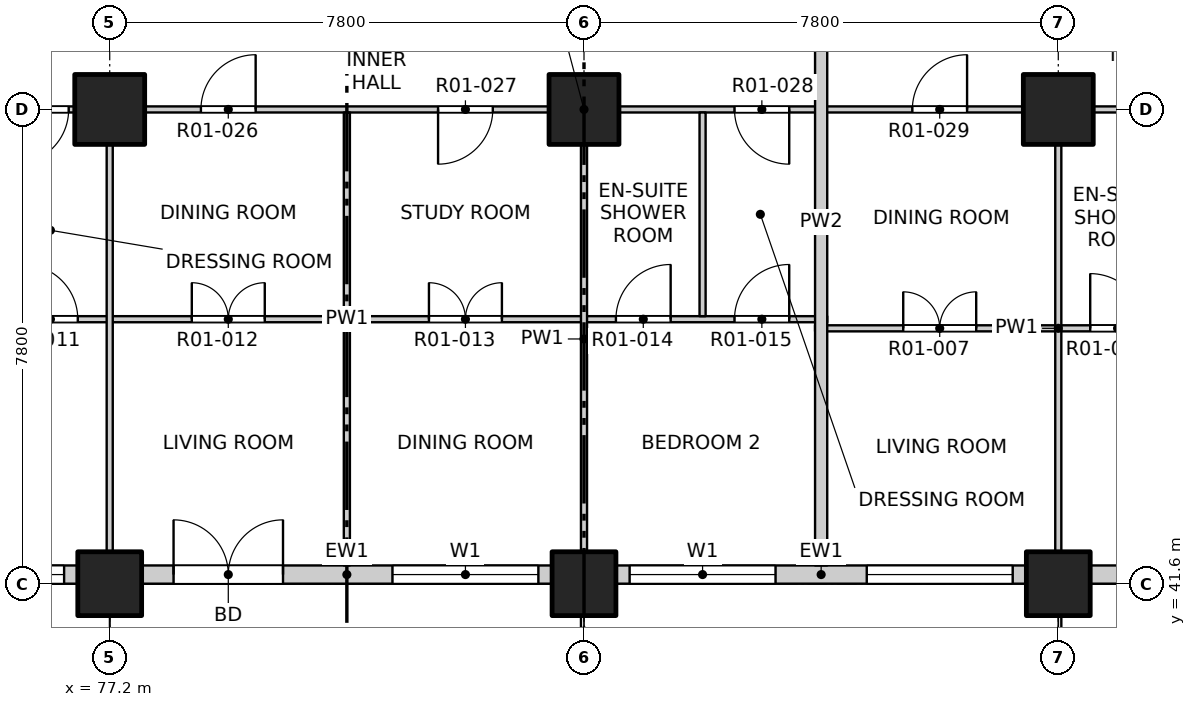
"""IFC4 building model, lengths in metres.
Left out: names, types, materials, properties, quantities, classifications, styles, units other than length and angle.
Written with IfcOpenShell. Run it as: python <this file> out.ifc"""

import sys

from ifc_helpers import new_model, si_unit, direction, frame, frame_2d, origin, origin_2d, place, context, subcontext, project, spatial, rectangle, extrude, element, fill, save


model = new_model("IFC4")
c1 = context("Model", 3, precision=1e-05, world=origin(), true_north=direction((0.0, 1.0)))
c2 = subcontext(c1, "Body", "Model", "MODEL_VIEW")
j1 = project(units=[si_unit("LENGTHUNIT", "METRE"), si_unit("PLANEANGLEUNIT", "RADIAN")], contexts=[c1])
p1 = place(None, origin())
s1 = spatial("IfcSite", under=j1, at=p1, CompositionType="ELEMENT")
p2 = place(p1, origin())
s2 = spatial("IfcBuilding", under=s1, at=p2, CompositionType="ELEMENT")
p3 = place(p2, frame((0.0, 0.0, 19.5)))
s3 = spatial("IfcBuildingStorey", under=s2, at=p3, CompositionType="ELEMENT", Elevation=19.5)
for number, where, z_axis, x_axis in (
    (1, (77.2, 41.6, -0.25), (0.0, 0.0, 1.0), (1.0, 0.0, 0.0)),
    (2, (85.0, 41.6, -0.25), (0.0, 0.0, 1.0), (1.0, 0.0, 0.0)),
    (3, (92.8, 41.6, -0.25), (0.0, 0.0, 1.0), (1.0, 0.0, 0.0)),
):
    element("IfcColumn", number, at=place(p3, frame(where, z_axis=z_axis, x_axis=x_axis)), inside=s3, PredefinedType="COLUMN", context=c2, shape_type="SweptSolid", body=[
        extrude(rectangle(XDim=1.05, YDim=1.05, at=origin_2d()), origin(), (0.0, 0.0, 1.0), 3.4),
    ])
for number, where, z_axis, x_axis in (
    (4, (77.2, 49.4, -0.25), (0.0, 0.0, 1.0), (1.0, 0.0, 0.0)),
    (5, (85.0, 49.4, -0.25), (0.0, 0.0, 1.0), (1.0, 0.0, 0.0)),
    (6, (92.8, 49.4, -0.25), (0.0, 0.0, 1.0), (1.0, 0.0, 0.0)),
):
    element("IfcColumn", number, at=place(p3, frame(where, z_axis=z_axis, x_axis=x_axis)), inside=s3, PredefinedType="COLUMN", context=c2, shape_type="SweptSolid", body=[
        extrude(rectangle(XDim=1.15, YDim=1.15, at=origin_2d()), origin(), (0.0, 0.0, 1.0), 3.4),
    ])
p4 = place(p3, frame((69.925, 41.75, 0.0), z_axis=(0.0, 0.0, 1.0), x_axis=(1.0, 0.0, 0.0)))
e7 = element("IfcWall", 7, at=p4, inside=s3, PredefinedType="SOLIDWALL", context=c2, shape_type="SweptSolid", body=[
    extrude(rectangle(XDim=6.75, YDim=0.3, at=frame_2d((3.375, 0.0))), origin(), (0.0, 0.0, 1.0), 2.7),
])
p5 = place(p4, frame((0.525, 0.0, 0.0)))
e8 = element("IfcOpeningElement", 8, at=p5, cuts=e7, PredefinedType="OPENING", context=c2, shape_type="SweptSolid", body=[
    extrude(rectangle(XDim=1.8, YDim=2.4, at=frame_2d((0.9, 1.2))), frame((0.0, 0.16, 0.0), z_axis=(0.0, -1.0, 0.0), x_axis=(1.0, 0.0, 0.0)), (0.0, 0.0, 1.0), 0.32),
])
p6 = place(p4, frame((4.125, 0.0, 0.9)))
e9 = element("IfcOpeningElement", 9, at=p6, cuts=e7, PredefinedType="OPENING", context=c2, shape_type="SweptSolid", body=[
    extrude(rectangle(XDim=2.4, YDim=1.8, at=frame_2d((1.2, 0.9))), frame((0.0, 0.16, 0.0), z_axis=(0.0, -1.0, 0.0), x_axis=(1.0, 0.0, 0.0)), (0.0, 0.0, 1.0), 0.32),
])
p7 = place(p3, frame((77.725, 41.75, 0.0), z_axis=(0.0, 0.0, 1.0), x_axis=(1.0, 0.0, 0.0)))
e10 = element("IfcWall", 10, at=p7, inside=s3, PredefinedType="SOLIDWALL", context=c2, shape_type="SweptSolid", body=[
    extrude(rectangle(XDim=6.75, YDim=0.3, at=frame_2d((3.375, 0.0))), origin(), (0.0, 0.0, 1.0), 2.7),
])
p8 = place(p7, frame((0.525, 0.0, 0.0)))
e11 = element("IfcOpeningElement", 11, at=p8, cuts=e10, PredefinedType="OPENING", context=c2, shape_type="SweptSolid", body=[
    extrude(rectangle(XDim=1.8, YDim=2.4, at=frame_2d((0.9, 1.2))), frame((0.0, 0.16, 0.0), z_axis=(0.0, -1.0, 0.0), x_axis=(1.0, 0.0, 0.0)), (0.0, 0.0, 1.0), 0.32),
])
p9 = place(p7, frame((4.125, 0.0, 0.9)))
e12 = element("IfcOpeningElement", 12, at=p9, cuts=e10, PredefinedType="OPENING", context=c2, shape_type="SweptSolid", body=[
    extrude(rectangle(XDim=2.4, YDim=1.8, at=frame_2d((1.2, 0.9))), frame((0.0, 0.16, 0.0), z_axis=(0.0, -1.0, 0.0), x_axis=(1.0, 0.0, 0.0)), (0.0, 0.0, 1.0), 0.32),
])
p10 = place(p3, frame((85.525, 41.75, 0.0), z_axis=(0.0, 0.0, 1.0), x_axis=(1.0, 0.0, 0.0)))
e13 = element("IfcWall", 13, at=p10, inside=s3, PredefinedType="SOLIDWALL", context=c2, shape_type="SweptSolid", body=[
    extrude(rectangle(XDim=6.75, YDim=0.3, at=frame_2d((3.375, 0.0))), origin(), (0.0, 0.0, 1.0), 2.7),
])
p11 = place(p10, frame((0.225, 0.0, 0.9)))
e14 = element("IfcOpeningElement", 14, at=p11, cuts=e13, PredefinedType="OPENING", context=c2, shape_type="SweptSolid", body=[
    extrude(rectangle(XDim=2.4, YDim=1.8, at=frame_2d((1.2, 0.9))), frame((0.0, 0.16, 0.0), z_axis=(0.0, -1.0, 0.0), x_axis=(1.0, 0.0, 0.0)), (0.0, 0.0, 1.0), 0.32),
])
p12 = place(p10, frame((4.125, 0.0, 0.9)))
e15 = element("IfcOpeningElement", 15, at=p12, cuts=e13, PredefinedType="OPENING", context=c2, shape_type="SweptSolid", body=[
    extrude(rectangle(XDim=2.4, YDim=1.8, at=frame_2d((1.2, 0.9))), frame((0.0, 0.16, 0.0), z_axis=(0.0, -1.0, 0.0), x_axis=(1.0, 0.0, 0.0)), (0.0, 0.0, 1.0), 0.32),
])
p13 = place(p3, frame((93.325, 41.75, 0.0), z_axis=(0.0, 0.0, 1.0), x_axis=(1.0, 0.0, 0.0)))
e16 = element("IfcWall", 16, at=p13, inside=s3, PredefinedType="SOLIDWALL", context=c2, shape_type="SweptSolid", body=[
    extrude(rectangle(XDim=6.75, YDim=0.3, at=frame_2d((3.375, 0.0))), origin(), (0.0, 0.0, 1.0), 2.7),
])
p14 = place(p13, frame((0.525, 0.0, 0.0)))
e17 = element("IfcOpeningElement", 17, at=p14, cuts=e16, PredefinedType="OPENING", context=c2, shape_type="SweptSolid", body=[
    extrude(rectangle(XDim=1.8, YDim=2.4, at=frame_2d((0.9, 1.2))), frame((0.0, 0.16, 0.0), z_axis=(0.0, -1.0, 0.0), x_axis=(1.0, 0.0, 0.0)), (0.0, 0.0, 1.0), 0.32),
])
p15 = place(p13, frame((4.125, 0.0, 0.9)))
e18 = element("IfcOpeningElement", 18, at=p15, cuts=e16, PredefinedType="OPENING", context=c2, shape_type="SweptSolid", body=[
    extrude(rectangle(XDim=2.4, YDim=1.8, at=frame_2d((1.2, 0.9))), frame((0.0, 0.16, 0.0), z_axis=(0.0, -1.0, 0.0), x_axis=(1.0, 0.0, 0.0)), (0.0, 0.0, 1.0), 0.32),
])
p16 = place(p3, frame((88.8, 45.8, 0.0), z_axis=(0.0, 0.0, 1.0), x_axis=(1.0, 0.0, 0.0)))
e19 = element("IfcWall", 19, at=p16, inside=s3, PredefinedType="PARTITIONING", context=c2, shape_type="SweptSolid", body=[
    extrude(rectangle(XDim=8.0, YDim=0.1, at=frame_2d((4.0, 0.0))), origin(), (0.0, 0.0, 1.0), 3.15),
])
p17 = place(p16, frame((1.45, 0.0, 0.0)))
e20 = element("IfcOpeningElement", 20, at=p17, cuts=e19, PredefinedType="OPENING", context=c2, shape_type="SweptSolid", body=[
    extrude(rectangle(XDim=1.2, YDim=2.1, at=frame_2d((0.6, 1.05))), frame((0.0, 0.06, 0.0), z_axis=(0.0, -1.0, 0.0), x_axis=(1.0, 0.0, 0.0)), (0.0, 0.0, 1.0), 0.12),
])
p18 = place(p16, frame((4.525, 0.0, 0.0)))
e21 = element("IfcOpeningElement", 21, at=p18, cuts=e19, PredefinedType="OPENING", context=c2, shape_type="SweptSolid", body=[
    extrude(rectangle(XDim=0.9, YDim=2.1, at=frame_2d((0.45, 1.05))), frame((0.0, 0.06, 0.0), z_axis=(0.0, -1.0, 0.0), x_axis=(1.0, 0.0, 0.0)), (0.0, 0.0, 1.0), 0.12),
])
p19 = place(p16, frame((6.475, 0.0, 0.0)))
e22 = element("IfcOpeningElement", 22, at=p19, cuts=e19, PredefinedType="OPENING", context=c2, shape_type="SweptSolid", body=[
    extrude(rectangle(XDim=0.9, YDim=2.1, at=frame_2d((0.45, 1.05))), frame((0.0, 0.06, 0.0), z_axis=(0.0, -1.0, 0.0), x_axis=(1.0, 0.0, 0.0)), (0.0, 0.0, 1.0), 0.12),
])
p20 = place(p3, frame((73.2, 45.95, 0.0), z_axis=(0.0, 0.0, 1.0), x_axis=(1.0, 0.0, 0.0)))
e23 = element("IfcWall", 23, at=p20, inside=s3, PredefinedType="PARTITIONING", context=c2, shape_type="SweptSolid", body=[
    extrude(rectangle(XDim=15.8, YDim=0.1, at=frame_2d((7.9, 0.0))), origin(), (0.0, 0.0, 1.0), 3.15),
])
p21 = place(p20, frame((0.625, 0.0, 0.0)))
e24 = element("IfcOpeningElement", 24, at=p21, cuts=e23, PredefinedType="OPENING", context=c2, shape_type="SweptSolid", body=[
    extrude(rectangle(XDim=0.9, YDim=2.1, at=frame_2d((0.45, 1.05))), frame((0.0, 0.06, 0.0), z_axis=(0.0, -1.0, 0.0), x_axis=(1.0, 0.0, 0.0)), (0.0, 0.0, 1.0), 0.12),
])
p22 = place(p20, frame((2.575, 0.0, 0.0)))
e25 = element("IfcOpeningElement", 25, at=p22, cuts=e23, PredefinedType="OPENING", context=c2, shape_type="SweptSolid", body=[
    extrude(rectangle(XDim=0.9, YDim=2.1, at=frame_2d((0.45, 1.05))), frame((0.0, 0.06, 0.0), z_axis=(0.0, -1.0, 0.0), x_axis=(1.0, 0.0, 0.0)), (0.0, 0.0, 1.0), 0.12),
])
p23 = place(p20, frame((5.35, 0.0, 0.0)))
e26 = element("IfcOpeningElement", 26, at=p23, cuts=e23, PredefinedType="OPENING", context=c2, shape_type="SweptSolid", body=[
    extrude(rectangle(XDim=1.2, YDim=2.1, at=frame_2d((0.6, 1.05))), frame((0.0, 0.06, 0.0), z_axis=(0.0, -1.0, 0.0), x_axis=(1.0, 0.0, 0.0)), (0.0, 0.0, 1.0), 0.12),
])
p24 = place(p20, frame((9.25, 0.0, 0.0)))
e27 = element("IfcOpeningElement", 27, at=p24, cuts=e23, PredefinedType="OPENING", context=c2, shape_type="SweptSolid", body=[
    extrude(rectangle(XDim=1.2, YDim=2.1, at=frame_2d((0.6, 1.05))), frame((0.0, 0.06, 0.0), z_axis=(0.0, -1.0, 0.0), x_axis=(1.0, 0.0, 0.0)), (0.0, 0.0, 1.0), 0.12),
])
p25 = place(p20, frame((12.325, 0.0, 0.0)))
e28 = element("IfcOpeningElement", 28, at=p25, cuts=e23, PredefinedType="OPENING", context=c2, shape_type="SweptSolid", body=[
    extrude(rectangle(XDim=0.9, YDim=2.1, at=frame_2d((0.45, 1.05))), frame((0.0, 0.06, 0.0), z_axis=(0.0, -1.0, 0.0), x_axis=(1.0, 0.0, 0.0)), (0.0, 0.0, 1.0), 0.12),
])
p26 = place(p20, frame((14.275, 0.0, 0.0)))
e29 = element("IfcOpeningElement", 29, at=p26, cuts=e23, PredefinedType="OPENING", context=c2, shape_type="SweptSolid", body=[
    extrude(rectangle(XDim=0.9, YDim=2.1, at=frame_2d((0.45, 1.05))), frame((0.0, 0.06, 0.0), z_axis=(0.0, -1.0, 0.0), x_axis=(1.0, 0.0, 0.0)), (0.0, 0.0, 1.0), 0.12),
])
p27 = place(p3, frame((73.2, 49.4, 0.0), z_axis=(0.0, 0.0, 1.0), x_axis=(1.0, 0.0, 0.0)))
e30 = element("IfcWall", 30, at=p27, inside=s3, PredefinedType="PARTITIONING", context=c2, shape_type="SweptSolid", body=[
    extrude(rectangle(XDim=23.6, YDim=0.1, at=frame_2d((11.8, 0.0))), origin(), (0.0, 0.0, 1.0), 3.15),
])
p28 = place(p27, frame((2.425, 0.0, 0.0)))
e31 = element("IfcOpeningElement", 31, at=p28, cuts=e30, PredefinedType="OPENING", context=c2, shape_type="SweptSolid", body=[
    extrude(rectangle(XDim=0.9, YDim=2.1, at=frame_2d((0.45, 1.05))), frame((0.0, 0.06, 0.0), z_axis=(0.0, -1.0, 0.0), x_axis=(1.0, 0.0, 0.0)), (0.0, 0.0, 1.0), 0.12),
])
p29 = place(p27, frame((5.5, 0.0, 0.0)))
e32 = element("IfcOpeningElement", 32, at=p29, cuts=e30, PredefinedType="OPENING", context=c2, shape_type="SweptSolid", body=[
    extrude(rectangle(XDim=0.9, YDim=2.1, at=frame_2d((0.45, 1.05))), frame((0.0, 0.06, 0.0), z_axis=(0.0, -1.0, 0.0), x_axis=(1.0, 0.0, 0.0)), (0.0, 0.0, 1.0), 0.12),
])
p30 = place(p27, frame((9.4, 0.0, 0.0)))
e33 = element("IfcOpeningElement", 33, at=p30, cuts=e30, PredefinedType="OPENING", context=c2, shape_type="SweptSolid", body=[
    extrude(rectangle(XDim=0.9, YDim=2.1, at=frame_2d((0.45, 1.05))), frame((0.0, 0.06, 0.0), z_axis=(0.0, -1.0, 0.0), x_axis=(1.0, 0.0, 0.0)), (0.0, 0.0, 1.0), 0.12),
])
p31 = place(p27, frame((14.275, 0.0, 0.0)))
e34 = element("IfcOpeningElement", 34, at=p31, cuts=e30, PredefinedType="OPENING", context=c2, shape_type="SweptSolid", body=[
    extrude(rectangle(XDim=0.9, YDim=2.1, at=frame_2d((0.45, 1.05))), frame((0.0, 0.06, 0.0), z_axis=(0.0, -1.0, 0.0), x_axis=(1.0, 0.0, 0.0)), (0.0, 0.0, 1.0), 0.12),
])
p32 = place(p27, frame((17.2, 0.0, 0.0)))
e35 = element("IfcOpeningElement", 35, at=p32, cuts=e30, PredefinedType="OPENING", context=c2, shape_type="SweptSolid", body=[
    extrude(rectangle(XDim=0.9, YDim=2.1, at=frame_2d((0.45, 1.05))), frame((0.0, 0.06, 0.0), z_axis=(0.0, -1.0, 0.0), x_axis=(1.0, 0.0, 0.0)), (0.0, 0.0, 1.0), 0.12),
])
p33 = place(p27, frame((22.075, 0.0, 0.0)))
e36 = element("IfcOpeningElement", 36, at=p33, cuts=e30, PredefinedType="OPENING", context=c2, shape_type="SweptSolid", body=[
    extrude(rectangle(XDim=0.9, YDim=2.1, at=frame_2d((0.45, 1.05))), frame((0.0, 0.06, 0.0), z_axis=(0.0, -1.0, 0.0), x_axis=(1.0, 0.0, 0.0)), (0.0, 0.0, 1.0), 0.12),
])
p34 = place(p3, frame((77.2, 41.9, 0.0), z_axis=(0.0, 0.0, 1.0), x_axis=(0.0, 1.0, 0.0)))
e37 = element("IfcWall", 37, at=p34, inside=s3, PredefinedType="PARTITIONING", context=c2, shape_type="SweptSolid", body=[
    extrude(rectangle(XDim=7.45, YDim=0.1, at=frame_2d((3.725, 0.0))), origin(), (0.0, 0.0, 1.0), 2.55),
])
p35 = place(p3, frame((81.1, 41.9, 0.0), z_axis=(0.0, 0.0, 1.0), x_axis=(0.0, 1.0, 0.0)))
e38 = element("IfcWall", 38, at=p35, inside=s3, PredefinedType="PARTITIONING", context=c2, shape_type="SweptSolid", body=[
    extrude(rectangle(XDim=7.45, YDim=0.1, at=frame_2d((3.725, 0.0))), origin(), (0.0, 0.0, 1.0), 3.15),
])
p36 = place(p3, frame((85.0, 41.9, 0.0), z_axis=(0.0, 0.0, 1.0), x_axis=(0.0, 1.0, 0.0)))
e39 = element("IfcWall", 39, at=p36, inside=s3, PredefinedType="PARTITIONING", context=c2, shape_type="SweptSolid", body=[
    extrude(rectangle(XDim=7.45, YDim=0.1, at=frame_2d((3.725, 0.0))), origin(), (0.0, 0.0, 1.0), 2.55),
])
p37 = place(p3, frame((86.95, 46.0, 0.0), z_axis=(0.0, 0.0, 1.0), x_axis=(0.0, 1.0, 0.0)))
e40 = element("IfcWall", 40, at=p37, inside=s3, PredefinedType="PARTITIONING", context=c2, shape_type="SweptSolid", body=[
    extrude(rectangle(XDim=3.35, YDim=0.1, at=frame_2d((1.675, 0.0))), origin(), (0.0, 0.0, 1.0), 3.15),
])
p38 = place(p3, frame((88.9, 41.9, 0.0), z_axis=(0.0, 0.0, 1.0), x_axis=(0.0, 1.0, 0.0)))
e41 = element("IfcWall", 41, at=p38, inside=s3, PredefinedType="PARTITIONING", context=c2, shape_type="SweptSolid", body=[
    extrude(rectangle(XDim=11.3, YDim=0.2, at=frame_2d((5.65, 0.0))), origin(), (0.0, 0.0, 1.0), 3.15),
])
p39 = place(p3, frame((92.8, 41.9, 0.0), z_axis=(0.0, 0.0, 1.0), x_axis=(0.0, 1.0, 0.0)))
e42 = element("IfcWall", 42, at=p39, inside=s3, PredefinedType="PARTITIONING", context=c2, shape_type="SweptSolid", body=[
    extrude(rectangle(XDim=7.45, YDim=0.1, at=frame_2d((3.725, 0.0))), origin(), (0.0, 0.0, 1.0), 2.55),
])
p40 = place(p6, origin())
e43 = element("IfcWindow", 43, at=p40, inside=s3, PartitioningType="DOUBLE_PANEL_VERTICAL", PredefinedType="WINDOW", context=c2, shape_type="SweptSolid", body=[
    extrude(rectangle(XDim=2.4, YDim=1.8, at=frame_2d((1.2, 0.9))), frame((0.0, 0.03, 0.0), z_axis=(0.0, -1.0, 0.0), x_axis=(1.0, 0.0, 0.0)), (0.0, 0.0, 1.0), 0.06),
])
fill(e9, e43)
p41 = place(p8, origin())
e44 = element("IfcDoor", 44, at=p41, inside=s3, OperationType="DOUBLE_DOOR_SINGLE_SWING", PredefinedType="DOOR", context=c2, shape_type="SweptSolid", body=[
    extrude(rectangle(XDim=1.8, YDim=2.4, at=frame_2d((0.9, 1.2))), frame((0.0, 0.025, 0.0), z_axis=(0.0, -1.0, 0.0), x_axis=(1.0, 0.0, 0.0)), (0.0, 0.0, 1.0), 0.05),
])
fill(e11, e44)
p42 = place(p9, origin())
e45 = element("IfcWindow", 45, at=p42, inside=s3, PartitioningType="DOUBLE_PANEL_VERTICAL", PredefinedType="WINDOW", context=c2, shape_type="SweptSolid", body=[
    extrude(rectangle(XDim=2.4, YDim=1.8, at=frame_2d((1.2, 0.9))), frame((0.0, 0.03, 0.0), z_axis=(0.0, -1.0, 0.0), x_axis=(1.0, 0.0, 0.0)), (0.0, 0.0, 1.0), 0.06),
])
fill(e12, e45)
p43 = place(p11, origin())
e46 = element("IfcWindow", 46, at=p43, inside=s3, PartitioningType="DOUBLE_PANEL_VERTICAL", PredefinedType="WINDOW", context=c2, shape_type="SweptSolid", body=[
    extrude(rectangle(XDim=2.4, YDim=1.8, at=frame_2d((1.2, 0.9))), frame((0.0, 0.03, 0.0), z_axis=(0.0, -1.0, 0.0), x_axis=(1.0, 0.0, 0.0)), (0.0, 0.0, 1.0), 0.06),
])
fill(e14, e46)
p44 = place(p12, origin())
e47 = element("IfcWindow", 47, at=p44, inside=s3, PartitioningType="DOUBLE_PANEL_VERTICAL", PredefinedType="WINDOW", context=c2, shape_type="SweptSolid", body=[
    extrude(rectangle(XDim=2.4, YDim=1.8, at=frame_2d((1.2, 0.9))), frame((0.0, 0.03, 0.0), z_axis=(0.0, -1.0, 0.0), x_axis=(1.0, 0.0, 0.0)), (0.0, 0.0, 1.0), 0.06),
])
fill(e15, e47)
p45 = place(p17, origin())
e48 = element("IfcDoor", 48, at=p45, inside=s3, OperationType="DOUBLE_DOOR_SINGLE_SWING", PredefinedType="DOOR", context=c2, shape_type="SweptSolid", body=[
    extrude(rectangle(XDim=1.2, YDim=2.1, at=frame_2d((0.6, 1.05))), frame((0.0, 0.025, 0.0), z_axis=(0.0, -1.0, 0.0), x_axis=(1.0, 0.0, 0.0)), (0.0, 0.0, 1.0), 0.05),
])
fill(e20, e48)
p46 = place(p18, origin())
e49 = element("IfcDoor", 49, at=p46, inside=s3, OperationType="SINGLE_SWING_LEFT", PredefinedType="DOOR", context=c2, shape_type="SweptSolid", body=[
    extrude(rectangle(XDim=0.9, YDim=2.1, at=frame_2d((0.45, 1.05))), frame((0.0, 0.025, 0.0), z_axis=(0.0, -1.0, 0.0), x_axis=(1.0, 0.0, 0.0)), (0.0, 0.0, 1.0), 0.05),
])
fill(e21, e49)
p47 = place(p22, origin())
e50 = element("IfcDoor", 50, at=p47, inside=s3, OperationType="SINGLE_SWING_LEFT", PredefinedType="DOOR", context=c2, shape_type="SweptSolid", body=[
    extrude(rectangle(XDim=0.9, YDim=2.1, at=frame_2d((0.45, 1.05))), frame((0.0, 0.025, 0.0), z_axis=(0.0, -1.0, 0.0), x_axis=(1.0, 0.0, 0.0)), (0.0, 0.0, 1.0), 0.05),
])
fill(e25, e50)
p48 = place(p23, origin())
e51 = element("IfcDoor", 51, at=p48, inside=s3, OperationType="DOUBLE_DOOR_SINGLE_SWING", PredefinedType="DOOR", context=c2, shape_type="SweptSolid", body=[
    extrude(rectangle(XDim=1.2, YDim=2.1, at=frame_2d((0.6, 1.05))), frame((0.0, 0.025, 0.0), z_axis=(0.0, -1.0, 0.0), x_axis=(1.0, 0.0, 0.0)), (0.0, 0.0, 1.0), 0.05),
])
fill(e26, e51)
p49 = place(p24, origin())
e52 = element("IfcDoor", 52, at=p49, inside=s3, OperationType="DOUBLE_DOOR_SINGLE_SWING", PredefinedType="DOOR", context=c2, shape_type="SweptSolid", body=[
    extrude(rectangle(XDim=1.2, YDim=2.1, at=frame_2d((0.6, 1.05))), frame((0.0, 0.025, 0.0), z_axis=(0.0, -1.0, 0.0), x_axis=(1.0, 0.0, 0.0)), (0.0, 0.0, 1.0), 0.05),
])
fill(e27, e52)
p50 = place(p25, origin())
e53 = element("IfcDoor", 53, at=p50, inside=s3, OperationType="SINGLE_SWING_RIGHT", PredefinedType="DOOR", context=c2, shape_type="SweptSolid", body=[
    extrude(rectangle(XDim=0.9, YDim=2.1, at=frame_2d((0.45, 1.05))), frame((0.0, 0.025, 0.0), z_axis=(0.0, -1.0, 0.0), x_axis=(1.0, 0.0, 0.0)), (0.0, 0.0, 1.0), 0.05),
])
fill(e28, e53)
p51 = place(p26, origin())
e54 = element("IfcDoor", 54, at=p51, inside=s3, OperationType="SINGLE_SWING_RIGHT", PredefinedType="DOOR", context=c2, shape_type="SweptSolid", body=[
    extrude(rectangle(XDim=0.9, YDim=2.1, at=frame_2d((0.45, 1.05))), frame((0.0, 0.025, 0.0), z_axis=(0.0, -1.0, 0.0), x_axis=(1.0, 0.0, 0.0)), (0.0, 0.0, 1.0), 0.05),
])
fill(e29, e54)
p52 = place(p28, origin())
e55 = element("IfcDoor", 55, at=p52, inside=s3, OperationType="SINGLE_SWING_RIGHT", PredefinedType="DOOR", context=c2, shape_type="SweptSolid", body=[
    extrude(rectangle(XDim=0.9, YDim=2.1, at=frame_2d((0.45, 1.05))), frame((0.0, 0.025, 0.0), z_axis=(0.0, -1.0, 0.0), x_axis=(1.0, 0.0, 0.0)), (0.0, 0.0, 1.0), 0.05),
])
fill(e31, e55)
p53 = place(p29, origin())
e56 = element("IfcDoor", 56, at=p53, inside=s3, OperationType="SINGLE_SWING_RIGHT", PredefinedType="DOOR", context=c2, shape_type="SweptSolid", body=[
    extrude(rectangle(XDim=0.9, YDim=2.1, at=frame_2d((0.45, 1.05))), frame((0.0, 0.025, 0.0), z_axis=(0.0, -1.0, 0.0), x_axis=(1.0, 0.0, 0.0)), (0.0, 0.0, 1.0), 0.05),
])
fill(e32, e56)
p54 = place(p30, origin())
e57 = element("IfcDoor", 57, at=p54, inside=s3, OperationType="SINGLE_SWING_RIGHT", PredefinedType="DOOR", context=c2, shape_type="SweptSolid", body=[
    extrude(rectangle(XDim=0.9, YDim=2.1, at=frame_2d((0.45, 1.05))), frame((0.0, 0.025, 0.0), z_axis=(0.0, -1.0, 0.0), x_axis=(1.0, 0.0, 0.0)), (0.0, 0.0, 1.0), 0.05),
])
fill(e33, e57)
p55 = place(p31, origin())
e58 = element("IfcDoor", 58, at=p55, inside=s3, OperationType="SINGLE_SWING_LEFT", PredefinedType="DOOR", context=c2, shape_type="SweptSolid", body=[
    extrude(rectangle(XDim=0.9, YDim=2.1, at=frame_2d((0.45, 1.05))), frame((0.0, 0.025, 0.0), z_axis=(0.0, -1.0, 0.0), x_axis=(1.0, 0.0, 0.0)), (0.0, 0.0, 1.0), 0.05),
])
fill(e34, e58)
p56 = place(p32, origin())
e59 = element("IfcDoor", 59, at=p56, inside=s3, OperationType="SINGLE_SWING_RIGHT", PredefinedType="DOOR", context=c2, shape_type="SweptSolid", body=[
    extrude(rectangle(XDim=0.9, YDim=2.1, at=frame_2d((0.45, 1.05))), frame((0.0, 0.025, 0.0), z_axis=(0.0, -1.0, 0.0), x_axis=(1.0, 0.0, 0.0)), (0.0, 0.0, 1.0), 0.05),
])
fill(e35, e59)
save(model, sys.argv[1])
